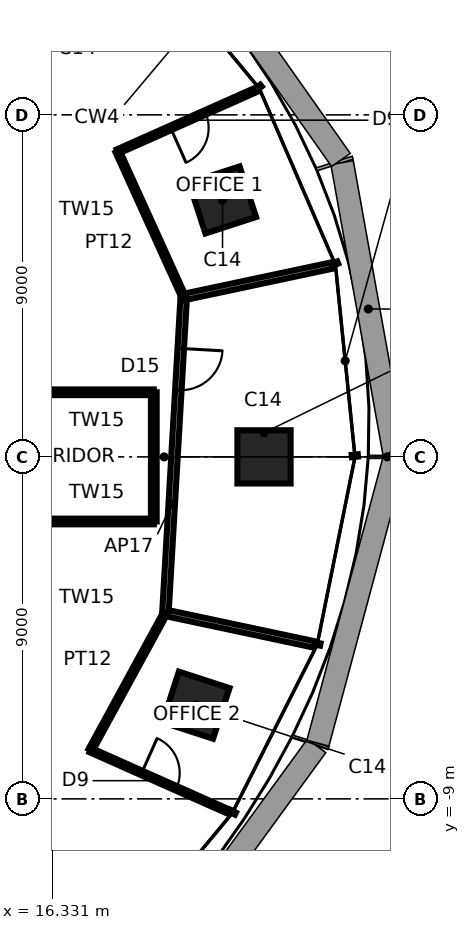
"""IFC4 building model, lengths in metres.
Left out: names, types, materials, properties, quantities, classifications, styles, units other than length and angle.
Written with IfcOpenShell. Run it as: python <this file> out.ifc"""

import sys

from ifc_helpers import new_model, si_unit, direction, frame, frame_2d, origin, origin_2d, place, context, subcontext, project, spatial, rectangle, extrude, element, fill, save


model = new_model("IFC4")
c1 = context("Model", 3, precision=1e-05, world=origin(), true_north=direction((0.0, 1.0)))
c2 = subcontext(c1, "Body", "Model", "MODEL_VIEW")
j1 = project(units=[si_unit("LENGTHUNIT", "METRE"), si_unit("PLANEANGLEUNIT", "RADIAN")], contexts=[c1])
p1 = place(None, origin())
s1 = spatial("IfcSite", under=j1, at=p1, CompositionType="ELEMENT")
p2 = place(p1, origin())
s2 = spatial("IfcBuilding", under=s1, at=p2, CompositionType="ELEMENT")
p3 = place(p2, frame((0.0, 0.0, 211.1)))
s3 = spatial("IfcBuildingStorey", under=s2, at=p3, CompositionType="ELEMENT", Elevation=211.1)
for number, where, z_axis, x_axis in (
    (1, (21.9, 0.0, 0.0), (0.0, 0.0, 1.0), (1.0, 0.0, 0.0)),
    (2, (20.808, 6.761, 0.0), (0.0, 0.0, 1.0), (0.951, 0.309, 0.0)),
    (3, (20.109, -6.534, 0.0), (0.0, 0.0, 1.0), (0.951, -0.309, 0.0)),
):
    element("IfcColumn", number, at=place(p3, frame(where, z_axis=z_axis, x_axis=x_axis)), inside=s3, PredefinedType="COLUMN", context=c2, shape_type="SweptSolid", body=[
        extrude(rectangle(XDim=1.4, YDim=1.4, at=origin_2d()), origin(), (0.0, 0.0, 1.0), 3.9),
    ])
p4 = place(p3, frame((17.335, -7.718, 0.0), z_axis=(0.0, 0.0, 1.0), x_axis=(0.913549606868, -0.406727323635, 0.0)))
e4 = element("IfcWall", 4, at=p4, inside=s3, PredefinedType="PARTITIONING", context=c2, shape_type="SweptSolid", body=[
    extrude(rectangle(XDim=4.0, YDim=0.12, at=frame_2d((2.0, 0.0))), origin(), (0.0, 0.0, 1.0), 3.74),
])
p5 = place(p4, frame((1.474, 0.0, 0.0)))
e5 = element("IfcOpeningElement", 5, at=p5, cuts=e4, PredefinedType="OPENING", context=c2, shape_type="SweptSolid", body=[
    extrude(rectangle(XDim=1.0, YDim=2.4, at=frame_2d((0.5, 1.2))), frame((0.0, 0.07, 0.0), z_axis=(0.0, -1.0, 0.0), x_axis=(1.0, 0.0, 0.0)), (0.0, 0.0, 1.0), 0.14),
])
p6 = place(p3, frame((19.306, -4.104, 0.0), z_axis=(0.0, 0.0, 1.0), x_axis=(-0.478739945202, -0.877956755694, 0.0)))
e6 = element("IfcWall", 6, at=p6, inside=s3, PredefinedType="PARTITIONING", context=c2, shape_type="SweptSolid", body=[
    extrude(rectangle(XDim=4.117, YDim=0.12, at=frame_2d((2.059, 0.0))), origin(), (0.0, 0.0, 1.0), 3.74),
])
p7 = place(p3, frame((19.306, -4.104, 0.0), z_axis=(0.0, 0.0, 1.0), x_axis=(0.978137903693, -0.207957306576, 0.0)))
e7 = element("IfcWall", 7, at=p7, inside=s3, PredefinedType="PARTITIONING", context=c2, shape_type="SweptSolid", body=[
    extrude(rectangle(XDim=4.0, YDim=0.17, at=frame_2d((2.0, 0.0))), origin(), (0.0, 0.0, 1.0), 3.74),
])
p8 = place(p3, frame((16.0, -1.7, 0.0), z_axis=(0.0, 0.0, 1.0), x_axis=(1.0, 0.0, 0.0)))
e8 = element("IfcWall", 8, at=p8, inside=s3, PredefinedType="PARTITIONING", context=c2, shape_type="SweptSolid", body=[
    extrude(rectangle(XDim=3.0, YDim=0.15, at=frame_2d((1.5, 0.0))), origin(), (0.0, 0.0, 1.0), 3.74),
])
p9 = place(p3, frame((19.0, -1.7, 0.0), z_axis=(0.0, 0.0, 1.0), x_axis=(0.0, 1.0, 0.0)))
e9 = element("IfcWall", 9, at=p9, inside=s3, PredefinedType="PARTITIONING", context=c2, shape_type="SweptSolid", body=[
    extrude(rectangle(XDim=3.4, YDim=0.15, at=frame_2d((1.7, 0.0))), origin(), (0.0, 0.0, 1.0), 3.334),
])
p10 = place(p3, frame((19.788, 4.206, 0.0), z_axis=(0.0, 0.0, 1.0), x_axis=(-0.0579293499, -0.998320685161, 0.0)))
e10 = element("IfcWall", 10, at=p10, inside=s3, PredefinedType="PARTITIONING", context=c2, shape_type="SweptSolid", body=[
    extrude(rectangle(XDim=8.323, YDim=0.17, at=frame_2d((4.162, 0.0))), origin(), (0.0, 0.0, 1.0), 3.74),
])
p11 = place(p10, frame((1.354, 0.0, 0.0)))
e11 = element("IfcOpeningElement", 11, at=p11, cuts=e10, PredefinedType="OPENING", context=c2, shape_type="SweptSolid", body=[
    extrude(rectangle(XDim=1.1, YDim=2.4, at=frame_2d((0.55, 1.2))), frame((0.0, 0.095, 0.0), z_axis=(0.0, -1.0, 0.0), x_axis=(1.0, 0.0, 0.0)), (0.0, 0.0, 1.0), 0.19),
])
p12 = place(p3, frame((19.0, 1.7, 0.0), z_axis=(0.0, 0.0, 1.0), x_axis=(-1.0, 0.0, 0.0)))
e12 = element("IfcWall", 12, at=p12, inside=s3, PredefinedType="PARTITIONING", context=c2, shape_type="SweptSolid", body=[
    extrude(rectangle(XDim=3.0, YDim=0.15, at=frame_2d((1.5, 0.0))), origin(), (0.0, 0.0, 1.0), 3.74),
])
p13 = place(p3, frame((23.7, 5.038, 0.0), z_axis=(0.0, 0.0, 1.0), x_axis=(-0.978152955943, -0.207886494942, 0.0)))
e13 = element("IfcWall", 13, at=p13, inside=s3, PredefinedType="PARTITIONING", context=c2, shape_type="SweptSolid", body=[
    extrude(rectangle(XDim=4.0, YDim=0.17, at=frame_2d((2.0, 0.0))), origin(), (0.0, 0.0, 1.0), 3.74),
])
p14 = place(p3, frame((18.049, 8.036, 0.0), z_axis=(0.0, 0.0, 1.0), x_axis=(0.413444314282, -0.910529405889, 0.0)))
e14 = element("IfcWall", 14, at=p14, inside=s3, PredefinedType="PARTITIONING", context=c2, shape_type="SweptSolid", body=[
    extrude(rectangle(XDim=4.206, YDim=0.12, at=frame_2d((2.103, 0.0))), origin(), (0.0, 0.0, 1.0), 3.74),
])
p15 = place(p3, frame((21.703, 9.663, 0.0), z_axis=(0.0, 0.0, 1.0), x_axis=(-0.913539509426, -0.406750002727, 0.0)))
e15 = element("IfcWall", 15, at=p15, inside=s3, PredefinedType="PARTITIONING", context=c2, shape_type="SweptSolid", body=[
    extrude(rectangle(XDim=4.0, YDim=0.12, at=frame_2d((2.0, 0.0))), origin(), (0.0, 0.0, 1.0), 3.74),
])
p16 = place(p15, frame((1.474, 0.0, 0.0)))
e16 = element("IfcOpeningElement", 16, at=p16, cuts=e15, PredefinedType="OPENING", context=c2, shape_type="SweptSolid", body=[
    extrude(rectangle(XDim=1.0, YDim=2.4, at=frame_2d((0.5, 1.2))), frame((0.0, 0.07, 0.0), z_axis=(0.0, -1.0, 0.0), x_axis=(1.0, 0.0, 0.0)), (0.0, 0.0, 1.0), 0.14),
])
p17 = place(p16, origin())
e17 = element("IfcDoor", 17, at=p17, inside=s3, OperationType="SINGLE_SWING_RIGHT", PredefinedType="DOOR", context=c2, shape_type="SweptSolid", body=[
    extrude(rectangle(XDim=1.0, YDim=2.4, at=frame_2d((0.5, 1.2))), frame((0.0, 0.025, 0.0), z_axis=(0.0, -1.0, 0.0), x_axis=(1.0, 0.0, 0.0)), (0.0, 0.0, 1.0), 0.05),
])
fill(e16, e17)
p18 = place(p5, origin())
e18 = element("IfcDoor", 18, at=p18, inside=s3, OperationType="SINGLE_SWING_LEFT", PredefinedType="DOOR", context=c2, shape_type="SweptSolid", body=[
    extrude(rectangle(XDim=1.0, YDim=2.4, at=frame_2d((0.5, 1.2))), frame((0.0, 0.025, 0.0), z_axis=(0.0, -1.0, 0.0), x_axis=(1.0, 0.0, 0.0)), (0.0, 0.0, 1.0), 0.05),
])
fill(e5, e18)
p19 = place(p11, origin())
e19 = element("IfcDoor", 19, at=p19, inside=s3, OperationType="SINGLE_SWING_LEFT", PredefinedType="DOOR", context=c2, shape_type="SweptSolid", body=[
    extrude(rectangle(XDim=1.1, YDim=2.4, at=frame_2d((0.55, 1.2))), frame((0.0, 0.025, 0.0), z_axis=(0.0, -1.0, 0.0), x_axis=(1.0, 0.0, 0.0)), (0.0, 0.0, 1.0), 0.05),
])
fill(e11, e19)
save(model, sys.argv[1])
